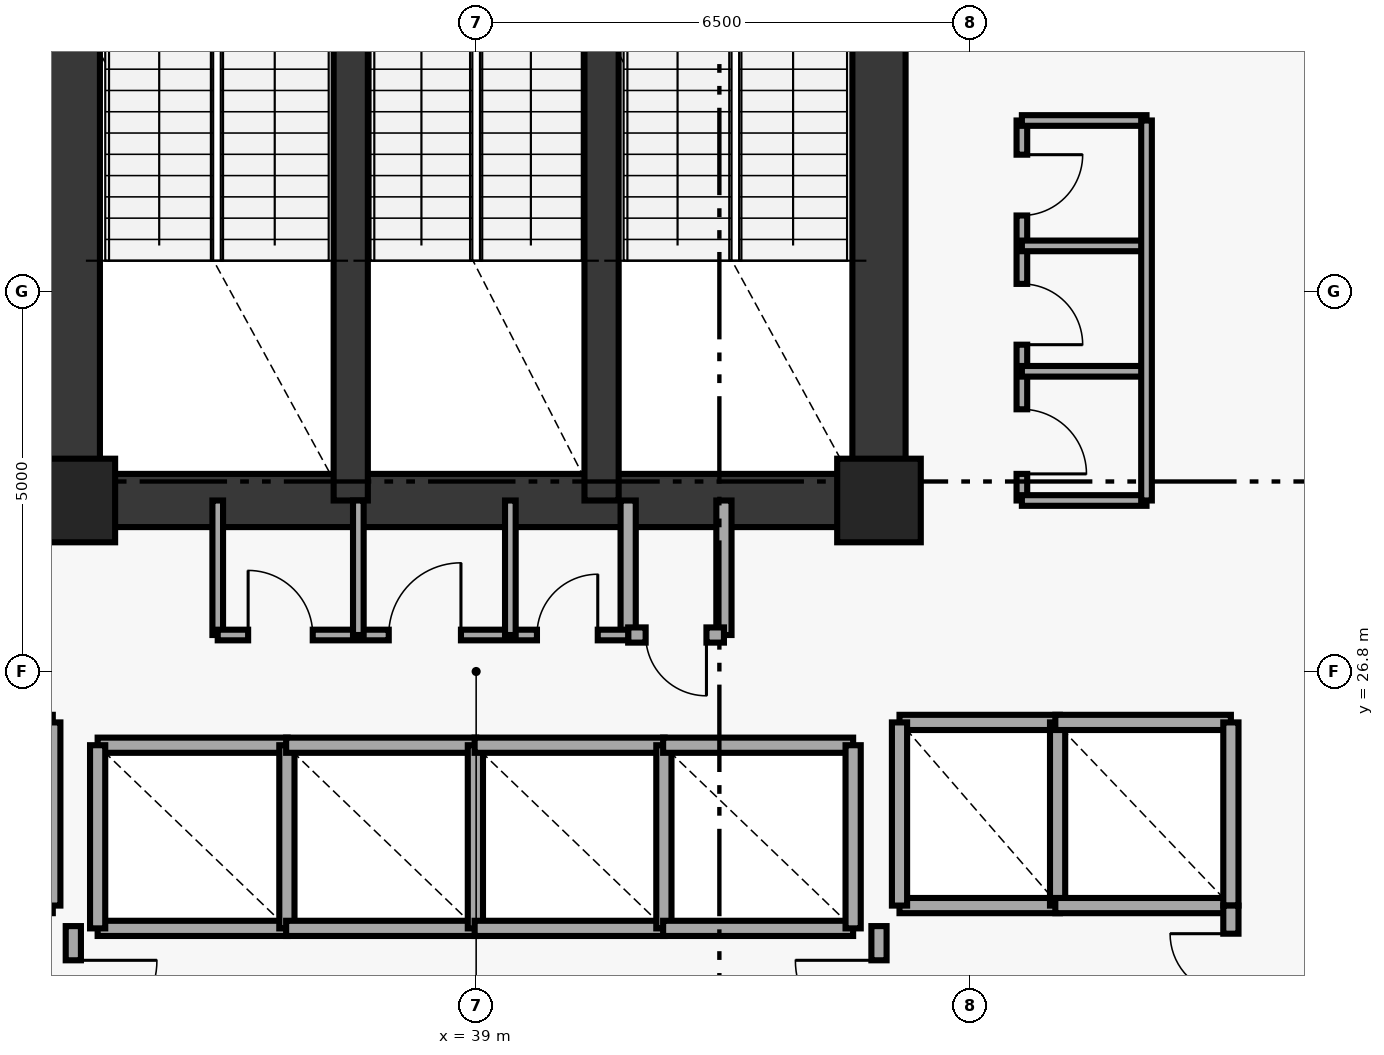
"""IFC4 building model, lengths in metres.
Left out: names, types, materials, properties, quantities, classifications, styles, units other than length and angle.
Written with IfcOpenShell. Run it as: python <this file> out.ifc"""

import sys

from ifc_helpers import new_model, si_unit, direction, frame, frame_2d, origin, origin_2d, place, context, subcontext, project, spatial, rectangle, extrude, element, fill, save


model = new_model("IFC4")
c1 = context("Model", 3, precision=1e-05, world=origin(), true_north=direction((0.0, 1.0)))
c2 = subcontext(c1, "Body", "Model", "MODEL_VIEW")
j1 = project(units=[si_unit("LENGTHUNIT", "METRE"), si_unit("PLANEANGLEUNIT", "RADIAN")], contexts=[c1])
p1 = place(None, origin())
s1 = spatial("IfcSite", under=j1, at=p1, CompositionType="ELEMENT")
p2 = place(p1, origin())
s2 = spatial("IfcBuilding", under=s1, at=p2, CompositionType="ELEMENT")
p3 = place(p2, frame((0.0, 0.0, 65.55)))
s3 = spatial("IfcBuildingStorey", under=s2, at=p3, CompositionType="ELEMENT", Elevation=65.55)
for number, where, z_axis, x_axis in (
    (1, (44.3, 29.05, 0.0), (0.0, 0.0, 1.0), (1.0, 0.0, 0.0)),
    (2, (33.7, 29.05, 0.0), (0.0, 0.0, 1.0), (1.0, 0.0, 0.0)),
):
    element("IfcColumn", number, at=place(p3, frame(where, z_axis=z_axis, x_axis=x_axis)), inside=s3, PredefinedType="PILASTER", context=c2, shape_type="SweptSolid", body=[
        extrude(rectangle(XDim=1.1, YDim=1.1, at=origin_2d()), origin(), (0.0, 0.0, 1.0), 3.8),
    ])
for number, where, z_axis, x_axis in (
    (3, (33.7, 29.05, 0.0), (0.0, 0.0, 1.0), (0.0, 1.0, 0.0)),
    (4, (44.3, 29.05, 0.0), (0.0, 0.0, 1.0), (0.0, 1.0, 0.0)),
):
    element("IfcWall", number, at=place(p3, frame(where, z_axis=z_axis, x_axis=x_axis)), inside=s3, PredefinedType="SHEAR", context=c2, shape_type="SweptSolid", body=[
        extrude(rectangle(XDim=8.35, YDim=0.7, at=frame_2d((4.175, 0.0))), origin(), (0.0, 0.0, 1.0), 3.8),
    ])
p4 = place(p3, frame((33.7, 29.05, 0.0), z_axis=(0.0, 0.0, 1.0), x_axis=(1.0, 0.0, 0.0)))
e5 = element("IfcWall", 5, at=p4, inside=s3, PredefinedType="SHEAR", context=c2, shape_type="SweptSolid", body=[
    extrude(rectangle(XDim=10.6, YDim=0.7, at=frame_2d((5.3, 0.0))), origin(), (0.0, 0.0, 1.0), 3.8),
])
for number, where, z_axis, x_axis in (
    (6, (37.35, 29.05, 0.0), (0.0, 0.0, 1.0), (0.0, 1.0, 0.0)),
    (7, (40.65, 29.05, 0.0), (0.0, 0.0, 1.0), (0.0, 1.0, 0.0)),
):
    element("IfcWall", number, at=place(p3, frame(where, z_axis=z_axis, x_axis=x_axis)), inside=s3, PredefinedType="SHEAR", context=c2, shape_type="SweptSolid", body=[
        extrude(rectangle(XDim=8.35, YDim=0.45, at=frame_2d((4.175, 0.0))), origin(), (0.0, 0.0, 1.0), 3.8),
    ])
p5 = place(p3, frame((35.6, 27.28, 0.0), z_axis=(0.0, 0.0, 1.0), x_axis=(0.0, 1.0, 0.0)))
e8 = element("IfcWall", 8, at=p5, inside=s3, PredefinedType="PARTITIONING", context=c2, shape_type="SweptSolid", body=[
    extrude(rectangle(XDim=1.77, YDim=0.14, at=frame_2d((0.885, 0.0))), origin(), (0.0, 0.0, 1.0), 3.8),
])
for number, where, z_axis, x_axis in (
    (9, (41.0, 27.28, 0.0), (0.0, 0.0, 1.0), (0.0, 1.0, 0.0)),
    (10, (42.26, 27.28, 0.0), (0.0, 0.0, 1.0), (0.0, 1.0, 0.0)),
):
    element("IfcWall", number, at=place(p3, frame(where, z_axis=z_axis, x_axis=x_axis)), inside=s3, PredefinedType="SOLIDWALL", context=c2, shape_type="SweptSolid", body=[
        extrude(rectangle(XDim=1.77, YDim=0.2, at=frame_2d((0.885, 0.0))), origin(), (0.0, 0.0, 1.0), 3.8),
    ])
p6 = place(p3, frame((41.0, 27.28, 0.0), z_axis=(0.0, 0.0, 1.0), x_axis=(1.0, 0.0, 0.0)))
e11 = element("IfcWall", 11, at=p6, inside=s3, PredefinedType="SOLIDWALL", context=c2, shape_type="SweptSolid", body=[
    extrude(rectangle(XDim=1.26, YDim=0.2, at=frame_2d((0.63, 0.0))), origin(), (0.0, 0.0, 1.0), 3.8),
])
p7 = place(p6, frame((0.23, 0.0, 0.0)))
e12 = element("IfcOpeningElement", 12, at=p7, cuts=e11, PredefinedType="OPENING", context=c2, shape_type="SweptSolid", body=[
    extrude(rectangle(XDim=0.8, YDim=2.05, at=frame_2d((0.4, 1.025))), frame((0.0, 0.11, 0.0), z_axis=(0.0, -1.0, 0.0), x_axis=(1.0, 0.0, 0.0)), (0.0, 0.0, 1.0), 0.22),
])
p8 = place(p3, frame((31.32, 23.72, 0.0), z_axis=(0.0, 0.0, 1.0), x_axis=(1.0, 0.0, 0.0)))
e13 = element("IfcWall", 13, at=p8, inside=s3, PredefinedType="SOLIDWALL", context=c2, shape_type="SweptSolid", body=[
    extrude(rectangle(XDim=2.11, YDim=0.2, at=frame_2d((1.055, 0.0))), origin(), (0.0, 0.0, 1.0), 3.8),
])
p9 = place(p8, frame((0.505, 0.0, 0.0)))
e14 = element("IfcOpeningElement", 14, at=p9, cuts=e13, PredefinedType="OPENING", context=c2, shape_type="SweptSolid", body=[
    extrude(rectangle(XDim=1.1, YDim=2.15, at=frame_2d((0.55, 1.075))), frame((0.0, 0.11, 0.0), z_axis=(0.0, -1.0, 0.0), x_axis=(1.0, 0.0, 0.0)), (0.0, 0.0, 1.0), 0.22),
])
p10 = place(p3, frame((31.32, 26.13, 0.0), z_axis=(0.0, 0.0, 1.0), x_axis=(1.0, 0.0, 0.0)))
e15 = element("IfcWall", 15, at=p10, inside=s3, PredefinedType="SOLIDWALL", context=c2, shape_type="SweptSolid", body=[
    extrude(rectangle(XDim=2.11, YDim=0.2, at=frame_2d((1.055, 0.0))), origin(), (0.0, 0.0, 1.0), 3.8),
])
p11 = place(p3, frame((33.43, 23.72, 0.0), z_axis=(0.0, 0.0, 1.0), x_axis=(0.0, 1.0, 0.0)))
e16 = element("IfcWall", 16, at=p11, inside=s3, PredefinedType="SOLIDWALL", context=c2, shape_type="SweptSolid", body=[
    extrude(rectangle(XDim=2.41, YDim=0.2, at=frame_2d((1.205, 0.0))), origin(), (0.0, 0.0, 1.0), 3.8),
])
for number, where, z_axis, x_axis in (
    (17, (44.57, 23.72, 0.0), (0.0, 0.0, 1.0), (1.0, 0.0, 0.0)),
    (18, (44.57, 26.13, 0.0), (0.0, 0.0, 1.0), (1.0, 0.0, 0.0)),
):
    element("IfcWall", number, at=place(p3, frame(where, z_axis=z_axis, x_axis=x_axis)), inside=s3, PredefinedType="SOLIDWALL", context=c2, shape_type="SweptSolid", body=[
        extrude(rectangle(XDim=2.11, YDim=0.2, at=frame_2d((1.055, 0.0))), origin(), (0.0, 0.0, 1.0), 3.8),
    ])
for number, where, z_axis, x_axis in (
    (19, (44.57, 23.72, 0.0), (0.0, 0.0, 1.0), (0.0, 1.0, 0.0)),
    (20, (46.65, 23.72, 0.0), (0.0, 0.0, 1.0), (0.0, 1.0, 0.0)),
):
    element("IfcWall", number, at=place(p3, frame(where, z_axis=z_axis, x_axis=x_axis)), inside=s3, PredefinedType="SOLIDWALL", context=c2, shape_type="SweptSolid", body=[
        extrude(rectangle(XDim=2.41, YDim=0.2, at=frame_2d((1.205, 0.0))), origin(), (0.0, 0.0, 1.0), 3.8),
    ])
for number, where, z_axis, x_axis in (
    (21, (46.62, 23.72, 0.0), (0.0, 0.0, 1.0), (1.0, 0.0, 0.0)),
    (22, (46.62, 26.13, 0.0), (0.0, 0.0, 1.0), (1.0, 0.0, 0.0)),
):
    element("IfcWall", number, at=place(p3, frame(where, z_axis=z_axis, x_axis=x_axis)), inside=s3, PredefinedType="SOLIDWALL", context=c2, shape_type="SweptSolid", body=[
        extrude(rectangle(XDim=2.31, YDim=0.2, at=frame_2d((1.155, 0.0))), origin(), (0.0, 0.0, 1.0), 3.8),
    ])
p12 = place(p3, frame((48.93, 23.72, 0.0), z_axis=(0.0, 0.0, 1.0), x_axis=(0.0, 1.0, 0.0)))
e23 = element("IfcWall", 23, at=p12, inside=s3, PredefinedType="SOLIDWALL", context=c2, shape_type="SweptSolid", body=[
    extrude(rectangle(XDim=2.41, YDim=0.2, at=frame_2d((1.205, 0.0))), origin(), (0.0, 0.0, 1.0), 3.8),
])
for number, where, z_axis, x_axis in (
    (24, (34.02, 23.42, 0.0), (0.0, 0.0, 1.0), (1.0, 0.0, 0.0)),
    (25, (34.02, 25.83, 0.0), (0.0, 0.0, 1.0), (1.0, 0.0, 0.0)),
):
    element("IfcWall", number, at=place(p3, frame(where, z_axis=z_axis, x_axis=x_axis)), inside=s3, PredefinedType="SOLIDWALL", context=c2, shape_type="SweptSolid", body=[
        extrude(rectangle(XDim=2.5, YDim=0.2, at=frame_2d((1.25, 0.0))), origin(), (0.0, 0.0, 1.0), 3.8),
    ])
for number, where, z_axis, x_axis in (
    (26, (34.02, 23.42, 0.0), (0.0, 0.0, 1.0), (0.0, 1.0, 0.0)),
    (27, (36.51, 23.42, 0.0), (0.0, 0.0, 1.0), (0.0, 1.0, 0.0)),
):
    element("IfcWall", number, at=place(p3, frame(where, z_axis=z_axis, x_axis=x_axis)), inside=s3, PredefinedType="SOLIDWALL", context=c2, shape_type="SweptSolid", body=[
        extrude(rectangle(XDim=2.41, YDim=0.2, at=frame_2d((1.205, 0.0))), origin(), (0.0, 0.0, 1.0), 3.8),
    ])
for number, where, z_axis, x_axis in (
    (28, (36.5, 23.42, 0.0), (0.0, 0.0, 1.0), (1.0, 0.0, 0.0)),
    (29, (36.5, 25.83, 0.0), (0.0, 0.0, 1.0), (1.0, 0.0, 0.0)),
):
    element("IfcWall", number, at=place(p3, frame(where, z_axis=z_axis, x_axis=x_axis)), inside=s3, PredefinedType="SOLIDWALL", context=c2, shape_type="SweptSolid", body=[
        extrude(rectangle(XDim=2.5, YDim=0.2, at=frame_2d((1.25, 0.0))), origin(), (0.0, 0.0, 1.0), 3.8),
    ])
p13 = place(p3, frame((38.99, 23.42, 0.0), z_axis=(0.0, 0.0, 1.0), x_axis=(0.0, 1.0, 0.0)))
e30 = element("IfcWall", 30, at=p13, inside=s3, PredefinedType="SOLIDWALL", context=c2, shape_type="SweptSolid", body=[
    extrude(rectangle(XDim=2.41, YDim=0.2, at=frame_2d((1.205, 0.0))), origin(), (0.0, 0.0, 1.0), 3.8),
])
for number, where, z_axis, x_axis in (
    (31, (38.98, 23.42, 0.0), (0.0, 0.0, 1.0), (1.0, 0.0, 0.0)),
    (32, (38.98, 25.83, 0.0), (0.0, 0.0, 1.0), (1.0, 0.0, 0.0)),
):
    element("IfcWall", number, at=place(p3, frame(where, z_axis=z_axis, x_axis=x_axis)), inside=s3, PredefinedType="SOLIDWALL", context=c2, shape_type="SweptSolid", body=[
        extrude(rectangle(XDim=2.5, YDim=0.2, at=frame_2d((1.25, 0.0))), origin(), (0.0, 0.0, 1.0), 3.8),
    ])
p14 = place(p3, frame((41.47, 23.42, 0.0), z_axis=(0.0, 0.0, 1.0), x_axis=(0.0, 1.0, 0.0)))
e33 = element("IfcWall", 33, at=p14, inside=s3, PredefinedType="SOLIDWALL", context=c2, shape_type="SweptSolid", body=[
    extrude(rectangle(XDim=2.41, YDim=0.2, at=frame_2d((1.205, 0.0))), origin(), (0.0, 0.0, 1.0), 3.8),
])
for number, where, z_axis, x_axis in (
    (34, (41.46, 23.42, 0.0), (0.0, 0.0, 1.0), (1.0, 0.0, 0.0)),
    (35, (41.46, 25.83, 0.0), (0.0, 0.0, 1.0), (1.0, 0.0, 0.0)),
):
    element("IfcWall", number, at=place(p3, frame(where, z_axis=z_axis, x_axis=x_axis)), inside=s3, PredefinedType="SOLIDWALL", context=c2, shape_type="SweptSolid", body=[
        extrude(rectangle(XDim=2.5, YDim=0.2, at=frame_2d((1.25, 0.0))), origin(), (0.0, 0.0, 1.0), 3.8),
    ])
p15 = place(p3, frame((43.96, 23.42, 0.0), z_axis=(0.0, 0.0, 1.0), x_axis=(0.0, 1.0, 0.0)))
e36 = element("IfcWall", 36, at=p15, inside=s3, PredefinedType="SOLIDWALL", context=c2, shape_type="SweptSolid", body=[
    extrude(rectangle(XDim=2.41, YDim=0.2, at=frame_2d((1.205, 0.0))), origin(), (0.0, 0.0, 1.0), 3.8),
])
p16 = place(p3, frame((48.93, 21.38, 0.0), z_axis=(0.0, 0.0, 1.0), x_axis=(0.0, 1.0, 0.0)))
e37 = element("IfcWall", 37, at=p16, inside=s3, PredefinedType="SOLIDWALL", context=c2, shape_type="SweptSolid", body=[
    extrude(rectangle(XDim=2.34, YDim=0.2, at=frame_2d((1.17, 0.0))), origin(), (0.0, 0.0, 1.0), 3.8),
])
p17 = place(p16, frame((0.37, 0.0, 0.0)))
e38 = element("IfcOpeningElement", 38, at=p17, cuts=e37, PredefinedType="OPENING", context=c2, shape_type="SweptSolid", body=[
    extrude(rectangle(XDim=1.6, YDim=2.2, at=frame_2d((0.8, 1.1))), frame((0.0, 0.11, 0.0), z_axis=(0.0, -1.0, 0.0), x_axis=(1.0, 0.0, 0.0)), (0.0, 0.0, 1.0), 0.22),
])
p18 = place(p3, frame((33.7, 21.35, 0.0), z_axis=(0.0, 0.0, 1.0), x_axis=(0.0, 1.0, 0.0)))
e39 = element("IfcWall", 39, at=p18, inside=s3, PredefinedType="SOLIDWALL", context=c2, shape_type="SweptSolid", body=[
    extrude(rectangle(XDim=2.1, YDim=0.2, at=frame_2d((1.05, 0.0))), origin(), (0.0, 0.0, 1.0), 3.02),
])
p19 = place(p18, frame((0.55, 0.0, 0.0)))
e40 = element("IfcOpeningElement", 40, at=p19, cuts=e39, PredefinedType="OPENING", context=c2, shape_type="SweptSolid", body=[
    extrude(rectangle(XDim=1.1, YDim=2.15, at=frame_2d((0.55, 1.075))), frame((0.0, 0.11, 0.0), z_axis=(0.0, -1.0, 0.0), x_axis=(1.0, 0.0, 0.0)), (0.0, 0.0, 1.0), 0.22),
])
p20 = place(p3, frame((44.3, 21.35, 0.0), z_axis=(0.0, 0.0, 1.0), x_axis=(0.0, 1.0, 0.0)))
e41 = element("IfcWall", 41, at=p20, inside=s3, PredefinedType="SOLIDWALL", context=c2, shape_type="SweptSolid", body=[
    extrude(rectangle(XDim=2.1, YDim=0.2, at=frame_2d((1.05, 0.0))), origin(), (0.0, 0.0, 1.0), 3.02),
])
p21 = place(p20, frame((0.55, 0.0, 0.0)))
e42 = element("IfcOpeningElement", 42, at=p21, cuts=e41, PredefinedType="OPENING", context=c2, shape_type="SweptSolid", body=[
    extrude(rectangle(XDim=1.1, YDim=2.15, at=frame_2d((0.55, 1.075))), frame((0.0, 0.11, 0.0), z_axis=(0.0, -1.0, 0.0), x_axis=(1.0, 0.0, 0.0)), (0.0, 0.0, 1.0), 0.22),
])
p22 = place(p3, frame((35.6, 27.28, 0.0), z_axis=(0.0, 0.0, 1.0), x_axis=(1.0, 0.0, 0.0)))
e43 = element("IfcWall", 43, at=p22, inside=s3, PredefinedType="PARTITIONING", context=c2, shape_type="SweptSolid", body=[
    extrude(rectangle(XDim=5.4, YDim=0.14, at=frame_2d((2.7, 0.0))), origin(), (0.0, 0.0, 1.0), 3.8),
])
p23 = place(p22, frame((0.4, 0.0, 0.0)))
e44 = element("IfcOpeningElement", 44, at=p23, cuts=e43, PredefinedType="OPENING", context=c2, shape_type="SweptSolid", body=[
    extrude(rectangle(XDim=0.85, YDim=2.1, at=frame_2d((0.425, 1.05))), frame((0.0, 0.08, 0.0), z_axis=(0.0, -1.0, 0.0), x_axis=(1.0, 0.0, 0.0)), (0.0, 0.0, 1.0), 0.16),
])
p24 = place(p22, frame((2.25, 0.0, 0.0)))
e45 = element("IfcOpeningElement", 45, at=p24, cuts=e43, PredefinedType="OPENING", context=c2, shape_type="SweptSolid", body=[
    extrude(rectangle(XDim=0.95, YDim=2.1, at=frame_2d((0.475, 1.05))), frame((0.0, 0.08, 0.0), z_axis=(0.0, -1.0, 0.0), x_axis=(1.0, 0.0, 0.0)), (0.0, 0.0, 1.0), 0.16),
])
p25 = place(p22, frame((4.2, 0.0, 0.0)))
e46 = element("IfcOpeningElement", 46, at=p25, cuts=e43, PredefinedType="OPENING", context=c2, shape_type="SweptSolid", body=[
    extrude(rectangle(XDim=0.8, YDim=2.05, at=frame_2d((0.4, 1.025))), frame((0.0, 0.08, 0.0), z_axis=(0.0, -1.0, 0.0), x_axis=(1.0, 0.0, 0.0)), (0.0, 0.0, 1.0), 0.16),
])
for number, where, z_axis, x_axis in (
    (47, (37.45, 27.28, 0.0), (0.0, 0.0, 1.0), (0.0, 1.0, 0.0)),
    (48, (39.45, 27.28, 0.0), (0.0, 0.0, 1.0), (0.0, 1.0, 0.0)),
):
    element("IfcWall", number, at=place(p3, frame(where, z_axis=z_axis, x_axis=x_axis)), inside=s3, PredefinedType="PARTITIONING", context=c2, shape_type="SweptSolid", body=[
        extrude(rectangle(XDim=1.77, YDim=0.14, at=frame_2d((0.885, 0.0))), origin(), (0.0, 0.0, 1.0), 3.8),
    ])
p26 = place(p3, frame((46.18, 34.05, 0.0), z_axis=(0.0, 0.0, 1.0), x_axis=(0.0, -1.0, 0.0)))
e49 = element("IfcWall", 49, at=p26, inside=s3, PredefinedType="PARTITIONING", context=c2, shape_type="SweptSolid", body=[
    extrude(rectangle(XDim=5.0, YDim=0.14, at=frame_2d((2.5, 0.0))), origin(), (0.0, 0.0, 1.0), 3.8),
])
p27 = place(p26, frame((3.8, 0.0, 0.0)))
e50 = element("IfcOpeningElement", 50, at=p27, cuts=e49, PredefinedType="OPENING", context=c2, shape_type="SweptSolid", body=[
    extrude(rectangle(XDim=0.85, YDim=2.1, at=frame_2d((0.425, 1.05))), frame((0.0, 0.08, 0.0), z_axis=(0.0, -1.0, 0.0), x_axis=(1.0, 0.0, 0.0)), (0.0, 0.0, 1.0), 0.16),
])
p28 = place(p26, frame((2.15, 0.0, 0.0)))
e51 = element("IfcOpeningElement", 51, at=p28, cuts=e49, PredefinedType="OPENING", context=c2, shape_type="SweptSolid", body=[
    extrude(rectangle(XDim=0.8, YDim=2.05, at=frame_2d((0.4, 1.025))), frame((0.0, 0.08, 0.0), z_axis=(0.0, -1.0, 0.0), x_axis=(1.0, 0.0, 0.0)), (0.0, 0.0, 1.0), 0.16),
])
p29 = place(p26, frame((0.45, 0.0, 0.0)))
e52 = element("IfcOpeningElement", 52, at=p29, cuts=e49, PredefinedType="OPENING", context=c2, shape_type="SweptSolid", body=[
    extrude(rectangle(XDim=0.8, YDim=2.05, at=frame_2d((0.4, 1.025))), frame((0.0, 0.08, 0.0), z_axis=(0.0, -1.0, 0.0), x_axis=(1.0, 0.0, 0.0)), (0.0, 0.0, 1.0), 0.16),
])
for number, where, z_axis, x_axis in (
    (53, (46.18, 29.05, 0.0), (0.0, 0.0, 1.0), (1.0, 0.0, 0.0)),
    (54, (46.18, 30.75, 0.0), (0.0, 0.0, 1.0), (1.0, 0.0, 0.0)),
    (55, (46.18, 32.4, 0.0), (0.0, 0.0, 1.0), (1.0, 0.0, 0.0)),
    (56, (46.18, 34.05, 0.0), (0.0, 0.0, 1.0), (1.0, 0.0, 0.0)),
):
    element("IfcWall", number, at=place(p3, frame(where, z_axis=z_axis, x_axis=x_axis)), inside=s3, PredefinedType="PARTITIONING", context=c2, shape_type="SweptSolid", body=[
        extrude(rectangle(XDim=1.64, YDim=0.14, at=frame_2d((0.82, 0.0))), origin(), (0.0, 0.0, 1.0), 3.8),
    ])
p30 = place(p3, frame((47.82, 29.05, 0.0), z_axis=(0.0, 0.0, 1.0), x_axis=(0.0, 1.0, 0.0)))
e57 = element("IfcWall", 57, at=p30, inside=s3, PredefinedType="PARTITIONING", context=c2, shape_type="SweptSolid", body=[
    extrude(rectangle(XDim=5.0, YDim=0.14, at=frame_2d((2.5, 0.0))), origin(), (0.0, 0.0, 1.0), 3.8),
])
p31 = place(p3, frame((52.798, 31.069, 0.0), z_axis=(0.0, 0.0, 1.0), x_axis=(-0.32452502426, 0.945877110744, 0.0)))
e58 = element("IfcWall", 58, at=p31, inside=s3, PredefinedType="PARTITIONING", context=c2, shape_type="SweptSolid", body=[
    extrude(rectangle(XDim=8.832, YDim=0.16, at=frame_2d((4.416, 0.0))), origin(), (0.0, 0.0, 1.0), 3.8),
])
p32 = place(p7, origin())
e59 = element("IfcDoor", 59, at=p32, inside=s3, OperationType="SINGLE_SWING_RIGHT", PredefinedType="DOOR", context=c2, shape_type="SweptSolid", body=[
    extrude(rectangle(XDim=0.8, YDim=2.05, at=frame_2d((0.4, 1.025))), frame((0.0, 0.025, 0.0), z_axis=(0.0, -1.0, 0.0), x_axis=(1.0, 0.0, 0.0)), (0.0, 0.0, 1.0), 0.05),
])
fill(e12, e59)
p33 = place(p17, origin())
e60 = element("IfcDoor", 60, at=p33, inside=s3, OperationType="DOUBLE_DOOR_SINGLE_SWING", PredefinedType="DOOR", context=c2, shape_type="SweptSolid", body=[
    extrude(rectangle(XDim=1.6, YDim=2.2, at=frame_2d((0.8, 1.1))), frame((0.0, 0.025, 0.0), z_axis=(0.0, -1.0, 0.0), x_axis=(1.0, 0.0, 0.0)), (0.0, 0.0, 1.0), 0.05),
])
fill(e38, e60)
p34 = place(p19, origin())
e61 = element("IfcDoor", 61, at=p34, inside=s3, OperationType="SINGLE_SWING_RIGHT", PredefinedType="DOOR", context=c2, shape_type="SweptSolid", body=[
    extrude(rectangle(XDim=1.1, YDim=2.15, at=frame_2d((0.55, 1.075))), frame((0.0, 0.025, 0.0), z_axis=(0.0, -1.0, 0.0), x_axis=(1.0, 0.0, 0.0)), (0.0, 0.0, 1.0), 0.05),
])
fill(e40, e61)
p35 = place(p21, origin())
e62 = element("IfcDoor", 62, at=p35, inside=s3, OperationType="SINGLE_SWING_RIGHT", PredefinedType="DOOR", context=c2, shape_type="SweptSolid", body=[
    extrude(rectangle(XDim=1.1, YDim=2.15, at=frame_2d((0.55, 1.075))), frame((0.0, 0.025, 0.0), z_axis=(0.0, -1.0, 0.0), x_axis=(1.0, 0.0, 0.0)), (0.0, 0.0, 1.0), 0.05),
])
fill(e42, e62)
p36 = place(p23, origin())
e63 = element("IfcDoor", 63, at=p36, inside=s3, OperationType="SINGLE_SWING_LEFT", PredefinedType="DOOR", context=c2, shape_type="SweptSolid", body=[
    extrude(rectangle(XDim=0.85, YDim=2.1, at=frame_2d((0.425, 1.05))), frame((0.0, 0.025, 0.0), z_axis=(0.0, -1.0, 0.0), x_axis=(1.0, 0.0, 0.0)), (0.0, 0.0, 1.0), 0.05),
])
fill(e44, e63)
p37 = place(p24, origin())
e64 = element("IfcDoor", 64, at=p37, inside=s3, OperationType="SINGLE_SWING_RIGHT", PredefinedType="DOOR", context=c2, shape_type="SweptSolid", body=[
    extrude(rectangle(XDim=0.95, YDim=2.1, at=frame_2d((0.475, 1.05))), frame((0.0, 0.025, 0.0), z_axis=(0.0, -1.0, 0.0), x_axis=(1.0, 0.0, 0.0)), (0.0, 0.0, 1.0), 0.05),
])
fill(e45, e64)
p38 = place(p25, origin())
e65 = element("IfcDoor", 65, at=p38, inside=s3, OperationType="SINGLE_SWING_RIGHT", PredefinedType="DOOR", context=c2, shape_type="SweptSolid", body=[
    extrude(rectangle(XDim=0.8, YDim=2.05, at=frame_2d((0.4, 1.025))), frame((0.0, 0.025, 0.0), z_axis=(0.0, -1.0, 0.0), x_axis=(1.0, 0.0, 0.0)), (0.0, 0.0, 1.0), 0.05),
])
fill(e46, e65)
p39 = place(p27, origin())
e66 = element("IfcDoor", 66, at=p39, inside=s3, OperationType="SINGLE_SWING_RIGHT", PredefinedType="DOOR", context=c2, shape_type="SweptSolid", body=[
    extrude(rectangle(XDim=0.85, YDim=2.1, at=frame_2d((0.425, 1.05))), frame((0.0, 0.025, 0.0), z_axis=(0.0, -1.0, 0.0), x_axis=(1.0, 0.0, 0.0)), (0.0, 0.0, 1.0), 0.05),
])
fill(e50, e66)
p40 = place(p28, origin())
e67 = element("IfcDoor", 67, at=p40, inside=s3, OperationType="SINGLE_SWING_RIGHT", PredefinedType="DOOR", context=c2, shape_type="SweptSolid", body=[
    extrude(rectangle(XDim=0.8, YDim=2.05, at=frame_2d((0.4, 1.025))), frame((0.0, 0.025, 0.0), z_axis=(0.0, -1.0, 0.0), x_axis=(1.0, 0.0, 0.0)), (0.0, 0.0, 1.0), 0.05),
])
fill(e51, e67)
p41 = place(p29, origin())
e68 = element("IfcDoor", 68, at=p41, inside=s3, OperationType="SINGLE_SWING_LEFT", PredefinedType="DOOR", context=c2, shape_type="SweptSolid", body=[
    extrude(rectangle(XDim=0.8, YDim=2.05, at=frame_2d((0.4, 1.025))), frame((0.0, 0.025, 0.0), z_axis=(0.0, -1.0, 0.0), x_axis=(1.0, 0.0, 0.0)), (0.0, 0.0, 1.0), 0.05),
])
fill(e52, e68)
save(model, sys.argv[1])
